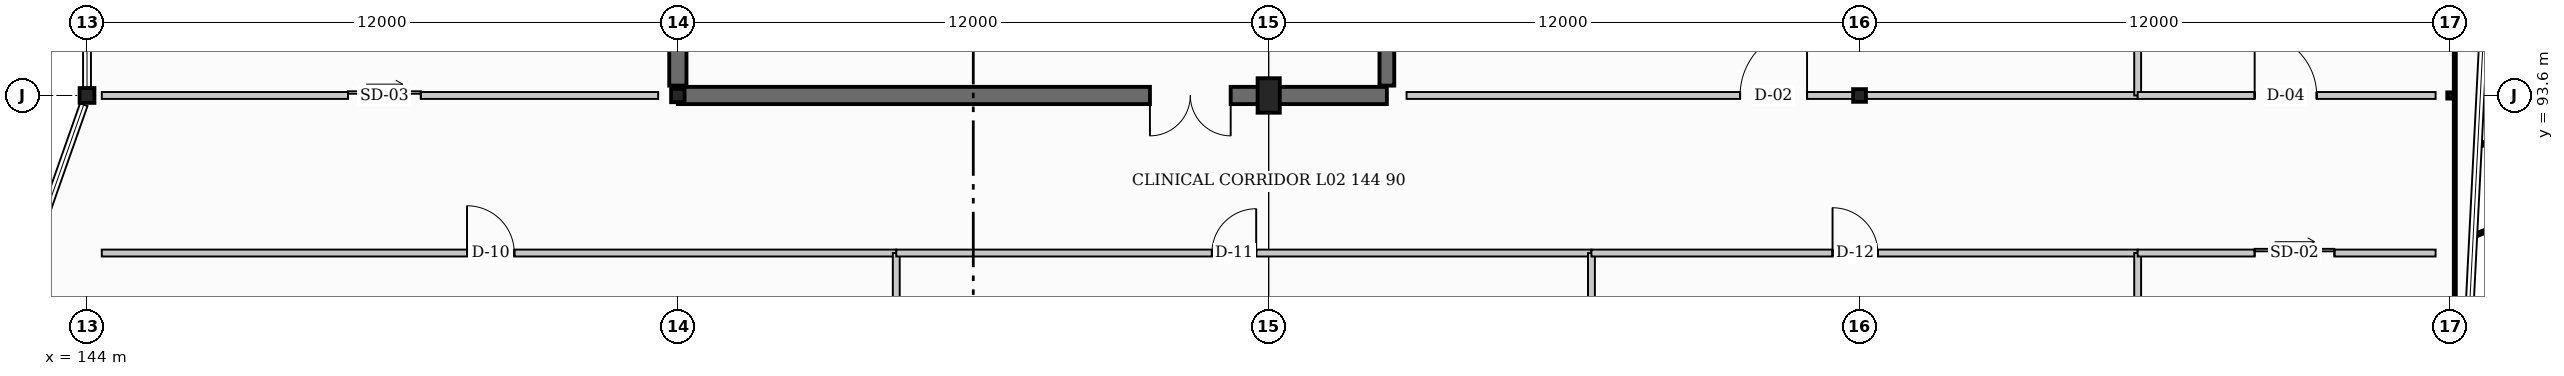
"""IFC4 building model, lengths in metres.
Left out: names, types, materials, properties, quantities, classifications, styles, units other than length and angle.
Written with IfcOpenShell. Run it as: python <this file> out.ifc"""

import sys

from ifc_helpers import new_model, si_unit, direction, frame, frame_2d, origin, origin_2d, place, context, subcontext, project, spatial, rectangle, hollow_rectangle, hollow_circle, i_section, extrude, element, fill, save


model = new_model("IFC4")
c1 = context("Model", 3, precision=1e-05, world=origin(), true_north=direction((0.0, 1.0)))
c2 = subcontext(c1, "Body", "Model", "MODEL_VIEW")
j1 = project(units=[si_unit("LENGTHUNIT", "METRE"), si_unit("PLANEANGLEUNIT", "RADIAN")], contexts=[c1])
p1 = place(None, origin())
s1 = spatial("IfcSite", under=j1, at=p1, CompositionType="ELEMENT")
p2 = place(p1, origin())
s2 = spatial("IfcBuilding", under=s1, at=p2, CompositionType="ELEMENT")
p3 = place(p2, frame((0.0, 0.0, 9.6)))
s3 = spatial("IfcBuildingStorey", under=s2, at=p3, CompositionType="ELEMENT", Elevation=9.6)
p4 = place(p3, frame((144.0, 93.6, 0.0), z_axis=(0.0, 0.0, 1.0), x_axis=(1.0, 0.0, 0.0)))
e1 = element("IfcColumn", 1, at=p4, inside=s3, PredefinedType="COLUMN", context=c2, shape_type="SweptSolid", body=[
    extrude(hollow_rectangle(XDim=0.3, YDim=0.3, WallThickness=0.012, at=origin_2d()), origin(), (0.0, 0.0, 1.0), 4.8),
])
p5 = place(p3, frame((156.0, 93.6, 0.0), z_axis=(0.0, 0.0, 1.0), x_axis=(0.0, 1.0, 0.0)))
e2 = element("IfcColumn", 2, at=p5, inside=s3, PredefinedType="COLUMN", context=c2, shape_type="SweptSolid", body=[
    extrude(hollow_circle(Radius=0.136, WallThickness=0.013, at=origin_2d()), origin(), (0.0, 0.0, 1.0), 4.8),
])
p6 = place(p3, frame((168.0, 93.6, 0.0), z_axis=(0.0, 0.0, 1.0), x_axis=(1.0, 0.0, 0.0)))
e3 = element("IfcColumn", 3, at=p6, inside=s3, PredefinedType="PILASTER", context=c2, shape_type="SweptSolid", body=[
    extrude(rectangle(XDim=0.45, YDim=0.7, at=origin_2d()), origin(), (0.0, 0.0, 1.0), 4.8),
])
p7 = place(p3, frame((180.0, 93.6, 0.0), z_axis=(0.0, 0.0, 1.0), x_axis=(0.0, 1.0, 0.0)))
e4 = element("IfcColumn", 4, at=p7, inside=s3, PredefinedType="COLUMN", context=c2, shape_type="SweptSolid", body=[
    extrude(i_section(OverallWidth=0.256, OverallDepth=0.26, WebThickness=0.01, FlangeThickness=0.017, at=origin_2d()), origin(), (0.0, 0.0, 1.0), 4.8),
])
p8 = place(p3, frame((192.0, 93.6, 0.0), z_axis=(0.0, 0.0, 1.0), x_axis=(1.0, 0.0, 0.0)))
e5 = element("IfcColumn", 5, at=p8, inside=s3, PredefinedType="COLUMN", context=c2, shape_type="SweptSolid", body=[
    extrude(hollow_rectangle(XDim=0.125, YDim=0.125, WallThickness=0.006, at=origin_2d()), origin(), (0.0, 0.0, 1.0), 4.8),
])
p9 = place(p3, frame((170.4, 93.6, 0.0), z_axis=(0.0, 0.0, 1.0), x_axis=(-1.0, 0.0, 0.0)))
e6 = element("IfcWall", 6, at=p9, inside=s3, PredefinedType="SHEAR", context=c2, shape_type="SweptSolid", body=[
    extrude(rectangle(XDim=14.4, YDim=0.35, at=frame_2d((7.2, 0.0))), origin(), (0.0, 0.0, 1.0), 4.8),
])
p10 = place(p9, frame((3.172, 0.0, 0.0)))
e7 = element("IfcOpeningElement", 7, at=p10, cuts=e6, PredefinedType="OPENING", context=c2, shape_type="SweptSolid", body=[
    extrude(rectangle(XDim=1.64, YDim=2.2, at=frame_2d((0.82, 1.1))), frame((0.0, 0.185, 0.0), z_axis=(0.0, -1.0, 0.0), x_axis=(1.0, 0.0, 0.0)), (0.0, 0.0, 1.0), 0.37),
])
p11 = place(p3, frame((156.0, 93.8, 0.0), z_axis=(0.0, 0.0, 1.0), x_axis=(0.0, 1.0, 0.0)))
e8 = element("IfcWall", 8, at=p11, inside=s3, PredefinedType="SHEAR", context=c2, shape_type="SweptSolid", body=[
    extrude(rectangle(XDim=8.0, YDim=0.35, at=frame_2d((4.0, 0.0))), origin(), (0.0, 0.0, 1.0), 4.8),
])
p12 = place(p3, frame((170.4, 101.8, 0.0), z_axis=(0.0, 0.0, 1.0), x_axis=(0.0, -1.0, 0.0)))
e9 = element("IfcWall", 9, at=p12, inside=s3, PredefinedType="SHEAR", context=c2, shape_type="SweptSolid", body=[
    extrude(rectangle(XDim=8.0, YDim=0.3, at=frame_2d((4.0, 0.0))), origin(), (0.0, 0.0, 1.0), 4.8),
])
p13 = place(p3, frame((144.3, 90.4, 0.0), z_axis=(0.0, 0.0, 1.0), x_axis=(1.0, 0.0, 0.0)))
e10 = element("IfcWall", 10, at=p13, inside=s3, PredefinedType="PARTITIONING", context=c2, shape_type="SweptSolid", body=[
    extrude(rectangle(XDim=16.136, YDim=0.14, at=frame_2d((8.068, 0.0))), origin(), (0.0, 0.0, 1.0), 3.973),
])
p14 = place(p13, frame((7.418, 0.0, 0.0)))
e11 = element("IfcOpeningElement", 11, at=p14, cuts=e10, PredefinedType="OPENING", context=c2, shape_type="SweptSolid", body=[
    extrude(rectangle(XDim=0.96, YDim=2.06, at=frame_2d((0.48, 1.03))), frame((0.0, 0.08, 0.0), z_axis=(0.0, -1.0, 0.0), x_axis=(1.0, 0.0, 0.0)), (0.0, 0.0, 1.0), 0.16),
])
p15 = place(p3, frame((160.436, 81.9, 0.0), z_axis=(0.0, 0.0, 1.0), x_axis=(0.0, 1.0, 0.0)))
e12 = element("IfcWall", 12, at=p15, inside=s3, PredefinedType="PARTITIONING", context=c2, shape_type="SweptSolid", body=[
    extrude(rectangle(XDim=8.5, YDim=0.14, at=frame_2d((4.25, 0.0))), origin(), (0.0, 0.0, 1.0), 3.902),
])
p16 = place(p3, frame((160.436, 90.4, 0.0), z_axis=(0.0, 0.0, 1.0), x_axis=(1.0, 0.0, 0.0)))
e13 = element("IfcWall", 13, at=p16, inside=s3, PredefinedType="PARTITIONING", context=c2, shape_type="SweptSolid", body=[
    extrude(rectangle(XDim=14.119, YDim=0.14, at=frame_2d((7.06, 0.0))), origin(), (0.0, 0.0, 1.0), 3.48),
])
p17 = place(p16, frame((6.41, 0.0, 0.0)))
e14 = element("IfcOpeningElement", 14, at=p17, cuts=e13, PredefinedType="OPENING", context=c2, shape_type="SweptSolid", body=[
    extrude(rectangle(XDim=0.9, YDim=2.1, at=frame_2d((0.45, 1.05))), frame((0.0, 0.08, 0.0), z_axis=(0.0, -1.0, 0.0), x_axis=(1.0, 0.0, 0.0)), (0.0, 0.0, 1.0), 0.16),
])
p18 = place(p3, frame((174.555, 81.9, 0.0), z_axis=(0.0, 0.0, 1.0), x_axis=(0.0, 1.0, 0.0)))
e15 = element("IfcWall", 15, at=p18, inside=s3, PredefinedType="PARTITIONING", context=c2, shape_type="SweptSolid", body=[
    extrude(rectangle(XDim=8.5, YDim=0.14, at=frame_2d((4.25, 0.0))), origin(), (0.0, 0.0, 1.0), 3.965),
])
p19 = place(p3, frame((174.555, 90.4, 0.0), z_axis=(0.0, 0.0, 1.0), x_axis=(1.0, 0.0, 0.0)))
e16 = element("IfcWall", 16, at=p19, inside=s3, PredefinedType="PARTITIONING", context=c2, shape_type="SweptSolid", body=[
    extrude(rectangle(XDim=11.094, YDim=0.14, at=frame_2d((5.547, 0.0))), origin(), (0.0, 0.0, 1.0), 3.525),
])
p20 = place(p19, frame((4.897, 0.0, 0.0)))
e17 = element("IfcOpeningElement", 17, at=p20, cuts=e16, PredefinedType="OPENING", context=c2, shape_type="SweptSolid", body=[
    extrude(rectangle(XDim=0.92, YDim=2.04, at=frame_2d((0.46, 1.02))), frame((0.0, 0.08, 0.0), z_axis=(0.0, -1.0, 0.0), x_axis=(1.0, 0.0, 0.0)), (0.0, 0.0, 1.0), 0.16),
])
p21 = place(p3, frame((185.649, 81.9, 0.0), z_axis=(0.0, 0.0, 1.0), x_axis=(0.0, 1.0, 0.0)))
e18 = element("IfcWall", 18, at=p21, inside=s3, PredefinedType="PARTITIONING", context=c2, shape_type="SweptSolid", body=[
    extrude(rectangle(XDim=8.5, YDim=0.14, at=frame_2d((4.25, 0.0))), origin(), (0.0, 0.0, 1.0), 3.968),
])
p22 = place(p3, frame((185.649, 90.4, 0.0), z_axis=(0.0, 0.0, 1.0), x_axis=(1.0, 0.0, 0.0)))
e19 = element("IfcWall", 19, at=p22, inside=s3, PredefinedType="PARTITIONING", context=c2, shape_type="SweptSolid", body=[
    extrude(rectangle(XDim=6.051, YDim=0.14, at=frame_2d((3.025, 0.0))), origin(), (0.0, 0.0, 1.0), 4.175),
])
p23 = place(p22, frame((2.376, 0.0, 0.0)))
e20 = element("IfcOpeningElement", 20, at=p23, cuts=e19, PredefinedType="OPENING", context=c2, shape_type="SweptSolid", body=[
    extrude(rectangle(XDim=1.62, YDim=2.3, at=frame_2d((0.81, 1.15))), frame((0.0, 0.08, 0.0), z_axis=(0.0, -1.0, 0.0), x_axis=(1.0, 0.0, 0.0)), (0.0, 0.0, 1.0), 0.16),
])
p24 = place(p3, frame((144.3, 93.6, 0.0), z_axis=(0.0, 0.0, 1.0), x_axis=(1.0, 0.0, 0.0)))
e21 = element("IfcWall", 21, at=p24, inside=s3, PredefinedType="PARTITIONING", context=c2, shape_type="SweptSolid", body=[
    extrude(rectangle(XDim=11.3, YDim=0.14, at=frame_2d((5.65, 0.0))), origin(), (0.0, 0.0, 1.0), 3.897),
])
p25 = place(p24, frame((5.0, 0.0, 0.0)))
e22 = element("IfcOpeningElement", 22, at=p25, cuts=e21, PredefinedType="OPENING", context=c2, shape_type="SweptSolid", body=[
    extrude(rectangle(XDim=1.48, YDim=2.26, at=frame_2d((0.74, 1.13))), frame((0.0, 0.08, 0.0), z_axis=(0.0, -1.0, 0.0), x_axis=(1.0, 0.0, 0.0)), (0.0, 0.0, 1.0), 0.16),
])
p26 = place(p3, frame((170.8, 93.6, 0.0), z_axis=(0.0, 0.0, 1.0), x_axis=(1.0, 0.0, 0.0)))
e23 = element("IfcWall", 23, at=p26, inside=s3, PredefinedType="PARTITIONING", context=c2, shape_type="SweptSolid", body=[
    extrude(rectangle(XDim=14.849, YDim=0.14, at=frame_2d((7.424, 0.0))), origin(), (0.0, 0.0, 1.0), 3.525),
])
p27 = place(p26, frame((6.774, 0.0, 0.0)))
e24 = element("IfcOpeningElement", 24, at=p27, cuts=e23, PredefinedType="OPENING", context=c2, shape_type="SweptSolid", body=[
    extrude(rectangle(XDim=1.36, YDim=2.18, at=frame_2d((0.68, 1.09))), frame((0.0, 0.08, 0.0), z_axis=(0.0, -1.0, 0.0), x_axis=(1.0, 0.0, 0.0)), (0.0, 0.0, 1.0), 0.16),
])
p28 = place(p3, frame((185.649, 93.6, 0.0), z_axis=(0.0, 0.0, 1.0), x_axis=(0.0, 1.0, 0.0)))
e25 = element("IfcWall", 25, at=p28, inside=s3, PredefinedType="PARTITIONING", context=c2, shape_type="SweptSolid", body=[
    extrude(rectangle(XDim=32.1, YDim=0.14, at=frame_2d((16.05, 0.0))), origin(), (0.0, 0.0, 1.0), 3.475),
])
p29 = place(p3, frame((185.649, 93.6, 0.0), z_axis=(0.0, 0.0, 1.0), x_axis=(1.0, 0.0, 0.0)))
e26 = element("IfcWall", 26, at=p29, inside=s3, PredefinedType="PARTITIONING", context=c2, shape_type="SweptSolid", body=[
    extrude(rectangle(XDim=6.051, YDim=0.14, at=frame_2d((3.025, 0.0))), origin(), (0.0, 0.0, 1.0), 3.971),
])
p30 = place(p29, frame((2.376, 0.0, 0.0)))
e27 = element("IfcOpeningElement", 27, at=p30, cuts=e26, PredefinedType="OPENING", context=c2, shape_type="SweptSolid", body=[
    extrude(rectangle(XDim=1.26, YDim=2.14, at=frame_2d((0.63, 1.07))), frame((0.0, 0.08, 0.0), z_axis=(0.0, -1.0, 0.0), x_axis=(1.0, 0.0, 0.0)), (0.0, 0.0, 1.0), 0.16),
])
p31 = place(p10, origin())
e28 = element("IfcDoor", 28, at=p31, inside=s3, OperationType="DOUBLE_DOOR_SINGLE_SWING", PredefinedType="DOOR", context=c2, shape_type="SweptSolid", body=[
    extrude(rectangle(XDim=1.64, YDim=2.2, at=frame_2d((0.82, 1.1))), frame((0.0, 0.025, 0.0), z_axis=(0.0, -1.0, 0.0), x_axis=(1.0, 0.0, 0.0)), (0.0, 0.0, 1.0), 0.05),
])
fill(e7, e28)
p32 = place(p14, origin())
e29 = element("IfcDoor", 29, at=p32, inside=s3, OperationType="SINGLE_SWING_LEFT", PredefinedType="DOOR", context=c2, shape_type="SweptSolid", body=[
    extrude(rectangle(XDim=0.96, YDim=2.06, at=frame_2d((0.48, 1.03))), frame((0.0, 0.025, 0.0), z_axis=(0.0, -1.0, 0.0), x_axis=(1.0, 0.0, 0.0)), (0.0, 0.0, 1.0), 0.05),
])
fill(e11, e29)
p33 = place(p17, origin())
e30 = element("IfcDoor", 30, at=p33, inside=s3, OperationType="SINGLE_SWING_RIGHT", PredefinedType="DOOR", context=c2, shape_type="SweptSolid", body=[
    extrude(rectangle(XDim=0.9, YDim=2.1, at=frame_2d((0.45, 1.05))), frame((0.0, 0.025, 0.0), z_axis=(0.0, -1.0, 0.0), x_axis=(1.0, 0.0, 0.0)), (0.0, 0.0, 1.0), 0.05),
])
fill(e14, e30)
p34 = place(p20, origin())
e31 = element("IfcDoor", 31, at=p34, inside=s3, OperationType="SINGLE_SWING_LEFT", PredefinedType="DOOR", context=c2, shape_type="SweptSolid", body=[
    extrude(rectangle(XDim=0.92, YDim=2.04, at=frame_2d((0.46, 1.02))), frame((0.0, 0.025, 0.0), z_axis=(0.0, -1.0, 0.0), x_axis=(1.0, 0.0, 0.0)), (0.0, 0.0, 1.0), 0.05),
])
fill(e17, e31)
p35 = place(p23, origin())
e32 = element("IfcDoor", 32, at=p35, inside=s3, OperationType="SLIDING_TO_RIGHT", PredefinedType="DOOR", context=c2, shape_type="SweptSolid", body=[
    extrude(rectangle(XDim=1.62, YDim=2.3, at=frame_2d((0.81, 1.15))), frame((0.0, 0.025, 0.0), z_axis=(0.0, -1.0, 0.0), x_axis=(1.0, 0.0, 0.0)), (0.0, 0.0, 1.0), 0.05),
])
fill(e20, e32)
p36 = place(p25, origin())
e33 = element("IfcDoor", 33, at=p36, inside=s3, OperationType="SLIDING_TO_LEFT", PredefinedType="DOOR", context=c2, shape_type="SweptSolid", body=[
    extrude(rectangle(XDim=1.48, YDim=2.26, at=frame_2d((0.74, 1.13))), frame((0.0, 0.025, 0.0), z_axis=(0.0, -1.0, 0.0), x_axis=(1.0, 0.0, 0.0)), (0.0, 0.0, 1.0), 0.05),
])
fill(e22, e33)
p37 = place(p27, origin())
e34 = element("IfcDoor", 34, at=p37, inside=s3, OperationType="SINGLE_SWING_RIGHT", PredefinedType="DOOR", context=c2, shape_type="SweptSolid", body=[
    extrude(rectangle(XDim=1.36, YDim=2.18, at=frame_2d((0.68, 1.09))), frame((0.0, 0.025, 0.0), z_axis=(0.0, -1.0, 0.0), x_axis=(1.0, 0.0, 0.0)), (0.0, 0.0, 1.0), 0.05),
])
fill(e24, e34)
p38 = place(p30, origin())
e35 = element("IfcDoor", 35, at=p38, inside=s3, OperationType="SINGLE_SWING_LEFT", PredefinedType="DOOR", context=c2, shape_type="SweptSolid", body=[
    extrude(rectangle(XDim=1.26, YDim=2.14, at=frame_2d((0.63, 1.07))), frame((0.0, 0.025, 0.0), z_axis=(0.0, -1.0, 0.0), x_axis=(1.0, 0.0, 0.0)), (0.0, 0.0, 1.0), 0.05),
])
fill(e27, e35)
save(model, sys.argv[1])
